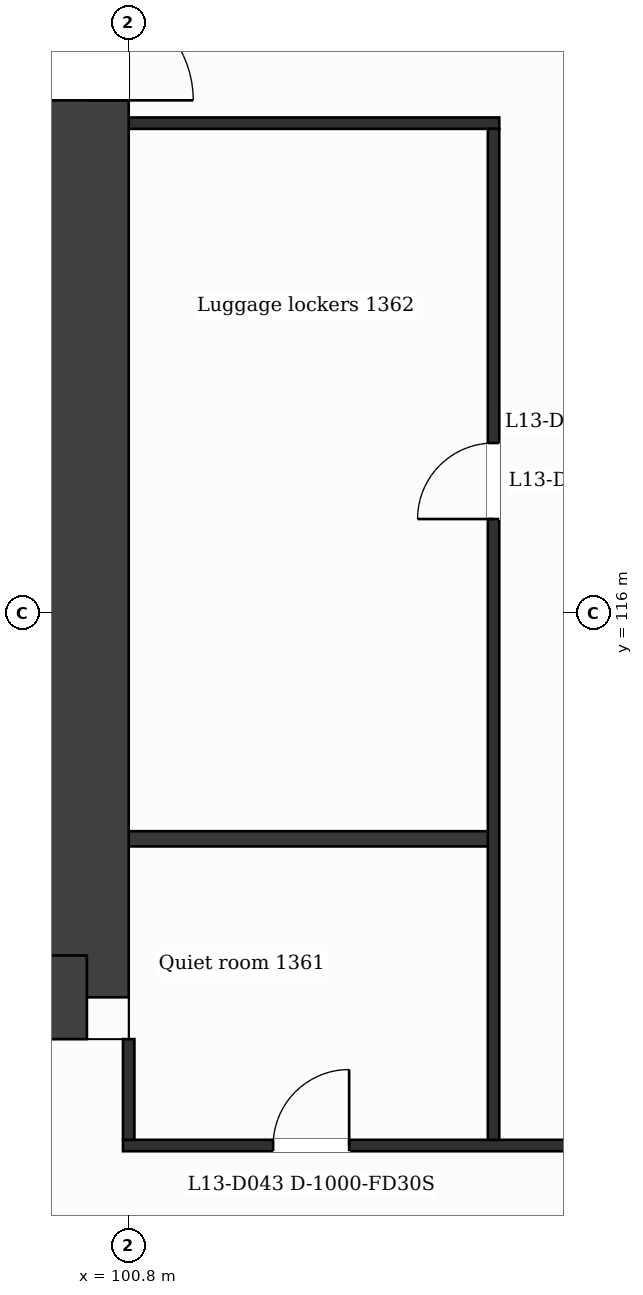
"""IFC4 building model, lengths in metres.
Left out: names, types, materials, properties, quantities, classifications, styles, units other than length and angle.
Written with IfcOpenShell. Run it as: python <this file> out.ifc"""

import sys

from ifc_helpers import new_model, si_unit, direction, frame, frame_2d, origin, place, context, subcontext, project, spatial, rectangle, extrude, element, fill, save


model = new_model("IFC4")
c1 = context("Model", 3, precision=1e-05, world=origin(), true_north=direction((0.0, 1.0)))
c2 = subcontext(c1, "Body", "Model", "MODEL_VIEW")
j1 = project(units=[si_unit("LENGTHUNIT", "METRE"), si_unit("PLANEANGLEUNIT", "RADIAN")], contexts=[c1])
p1 = place(None, origin())
s1 = spatial("IfcSite", under=j1, at=p1, CompositionType="ELEMENT")
p2 = place(p1, origin())
s2 = spatial("IfcBuilding", under=s1, at=p2, CompositionType="ELEMENT")
p3 = place(p2, frame((0.0, 0.0, 63.5)))
s3 = spatial("IfcBuildingStorey", under=s2, at=p3, CompositionType="ELEMENT", Elevation=63.5)
p4 = place(p3, frame((100.25, 131.85, 0.0), z_axis=(0.0, 0.0, 1.0), x_axis=(0.0, -1.0, 0.0)))
e1 = element("IfcWall", 1, at=p4, inside=s3, PredefinedType="SHEAR", context=c2, shape_type="SweptSolid", body=[
    extrude(rectangle(XDim=20.9, YDim=1.1, at=frame_2d((10.45, 0.0))), origin(), (0.0, 0.0, 1.0), 3.5),
])
p5 = place(p4, frame((7.7, 0.0, 0.0)))
e2 = element("IfcOpeningElement", 2, at=p5, cuts=e1, PredefinedType="OPENING", context=c2, shape_type="SweptSolid", body=[
    extrude(rectangle(XDim=1.4, YDim=2.1, at=frame_2d((0.7, 1.05))), frame((0.0, 0.56, 0.0), z_axis=(0.0, -1.0, 0.0), x_axis=(1.0, 0.0, 0.0)), (0.0, 0.0, 1.0), 1.12),
])
p6 = place(p3, frame((100.25, 110.95, 0.0), z_axis=(0.0, 0.0, 1.0), x_axis=(-1.0, 0.0, 0.0)))
e3 = element("IfcWall", 3, at=p6, inside=s3, PredefinedType="SHEAR", context=c2, shape_type="SweptSolid", body=[
    extrude(rectangle(XDim=13.952, YDim=1.1, at=frame_2d((6.976, 0.0))), origin(), (0.0, 0.0, 1.0), 3.5),
])
p7 = place(p6, frame((5.748, 0.0, 0.0)))
e4 = element("IfcOpeningElement", 4, at=p7, cuts=e3, PredefinedType="OPENING", context=c2, shape_type="SweptSolid", body=[
    extrude(rectangle(XDim=1.4, YDim=2.1, at=frame_2d((0.7, 1.05))), frame((0.0, 0.56, 0.0), z_axis=(0.0, -1.0, 0.0), x_axis=(1.0, 0.0, 0.0)), (0.0, 0.0, 1.0), 1.12),
])
p8 = place(p3, frame((100.725, 109.0, 0.0), z_axis=(0.0, 0.0, 1.0), x_axis=(1.0, 0.0, 0.0)))
e5 = element("IfcWall", 5, at=p8, inside=s3, PredefinedType="PARTITIONING", context=c2, shape_type="SweptSolid", body=[
    extrude(rectangle(XDim=25.35, YDim=0.15, at=frame_2d((12.675, 0.0))), origin(), (0.0, 0.0, 1.0), 3.18),
])
p9 = place(p8, frame((1.975, 0.0, 0.0)))
e6 = element("IfcOpeningElement", 6, at=p9, cuts=e5, PredefinedType="OPENING", context=c2, shape_type="SweptSolid", body=[
    extrude(rectangle(XDim=1.0, YDim=2.1, at=frame_2d((0.5, 1.05))), frame((0.0, 0.085, 0.0), z_axis=(0.0, -1.0, 0.0), x_axis=(1.0, 0.0, 0.0)), (0.0, 0.0, 1.0), 0.17),
])
p10 = place(p8, frame((10.325, 0.0, 0.0)))
e7 = element("IfcOpeningElement", 7, at=p10, cuts=e5, PredefinedType="OPENING", context=c2, shape_type="SweptSolid", body=[
    extrude(rectangle(XDim=1.0, YDim=2.1, at=frame_2d((0.5, 1.05))), frame((0.0, 0.085, 0.0), z_axis=(0.0, -1.0, 0.0), x_axis=(1.0, 0.0, 0.0)), (0.0, 0.0, 1.0), 0.17),
])
p11 = place(p8, frame((14.9, 0.0, 0.0)))
e8 = element("IfcOpeningElement", 8, at=p11, cuts=e5, PredefinedType="OPENING", context=c2, shape_type="SweptSolid", body=[
    extrude(rectangle(XDim=1.0, YDim=2.1, at=frame_2d((0.5, 1.05))), frame((0.0, 0.085, 0.0), z_axis=(0.0, -1.0, 0.0), x_axis=(1.0, 0.0, 0.0)), (0.0, 0.0, 1.0), 0.17),
])
p12 = place(p8, frame((22.685, 0.0, 0.0)))
e9 = element("IfcOpeningElement", 9, at=p12, cuts=e5, PredefinedType="OPENING", context=c2, shape_type="SweptSolid", body=[
    extrude(rectangle(XDim=1.0, YDim=2.1, at=frame_2d((0.5, 1.05))), frame((0.0, 0.085, 0.0), z_axis=(0.0, -1.0, 0.0), x_axis=(1.0, 0.0, 0.0)), (0.0, 0.0, 1.0), 0.17),
])
p13 = place(p3, frame((100.8, 113.035, 0.0), z_axis=(0.0, 0.0, 1.0), x_axis=(1.0, 0.0, 0.0)))
e10 = element("IfcWall", 10, at=p13, inside=s3, PredefinedType="PARTITIONING", context=c2, shape_type="SweptSolid", body=[
    extrude(rectangle(XDim=4.8, YDim=0.2, at=frame_2d((2.4, 0.0))), origin(), (0.0, 0.0, 1.0), 3.18),
])
p14 = place(p3, frame((100.8, 122.45, 0.0), z_axis=(0.0, 0.0, 1.0), x_axis=(1.0, 0.0, 0.0)))
e11 = element("IfcWall", 11, at=p14, inside=s3, PredefinedType="PARTITIONING", context=c2, shape_type="SweptSolid", body=[
    extrude(rectangle(XDim=4.875, YDim=0.15, at=frame_2d((2.438, 0.0))), origin(), (0.0, 0.0, 1.0), 3.18),
])
p15 = place(p3, frame((100.8, 109.075, 0.0), z_axis=(0.0, 0.0, 1.0), x_axis=(0.0, 1.0, 0.0)))
e12 = element("IfcWall", 12, at=p15, inside=s3, PredefinedType="PARTITIONING", context=c2, shape_type="SweptSolid", body=[
    extrude(rectangle(XDim=1.325, YDim=0.15, at=frame_2d((0.663, 0.0))), origin(), (0.0, 0.0, 1.0), 3.18),
])
p16 = place(p3, frame((105.6, 109.075, 0.0), z_axis=(0.0, 0.0, 1.0), x_axis=(0.0, 1.0, 0.0)))
e13 = element("IfcWall", 13, at=p16, inside=s3, PredefinedType="PARTITIONING", context=c2, shape_type="SweptSolid", body=[
    extrude(rectangle(XDim=13.3, YDim=0.15, at=frame_2d((6.65, 0.0))), origin(), (0.0, 0.0, 1.0), 3.18),
])
p17 = place(p16, frame((8.167, 0.0, 0.0)))
e14 = element("IfcOpeningElement", 14, at=p17, cuts=e13, PredefinedType="OPENING", context=c2, shape_type="SweptSolid", body=[
    extrude(rectangle(XDim=1.0, YDim=2.1, at=frame_2d((0.5, 1.05))), frame((0.0, 0.085, 0.0), z_axis=(0.0, -1.0, 0.0), x_axis=(1.0, 0.0, 0.0)), (0.0, 0.0, 1.0), 0.17),
])
p18 = place(p9, origin())
e15 = element("IfcDoor", 15, at=p18, inside=s3, OperationType="SINGLE_SWING_RIGHT", PredefinedType="DOOR", context=c2, shape_type="SweptSolid", body=[
    extrude(rectangle(XDim=1.0, YDim=2.1, at=frame_2d((0.5, 1.05))), frame((0.0, 0.025, 0.0), z_axis=(0.0, -1.0, 0.0), x_axis=(1.0, 0.0, 0.0)), (0.0, 0.0, 1.0), 0.05),
])
fill(e6, e15)
p19 = place(p17, origin())
e16 = element("IfcDoor", 16, at=p19, inside=s3, OperationType="SINGLE_SWING_LEFT", PredefinedType="DOOR", context=c2, shape_type="SweptSolid", body=[
    extrude(rectangle(XDim=1.0, YDim=2.1, at=frame_2d((0.5, 1.05))), frame((0.0, 0.025, 0.0), z_axis=(0.0, -1.0, 0.0), x_axis=(1.0, 0.0, 0.0)), (0.0, 0.0, 1.0), 0.05),
])
fill(e14, e16)
p20 = place(p5, origin())
e17 = element("IfcDoor", 17, at=p20, inside=s3, OperationType="SINGLE_SWING_RIGHT", PredefinedType="DOOR", context=c2, shape_type="SweptSolid", body=[
    extrude(rectangle(XDim=1.4, YDim=2.1, at=frame_2d((0.7, 1.05))), frame((0.0, 0.025, 0.0), z_axis=(0.0, -1.0, 0.0), x_axis=(1.0, 0.0, 0.0)), (0.0, 0.0, 1.0), 0.05),
])
fill(e2, e17)
save(model, sys.argv[1])
